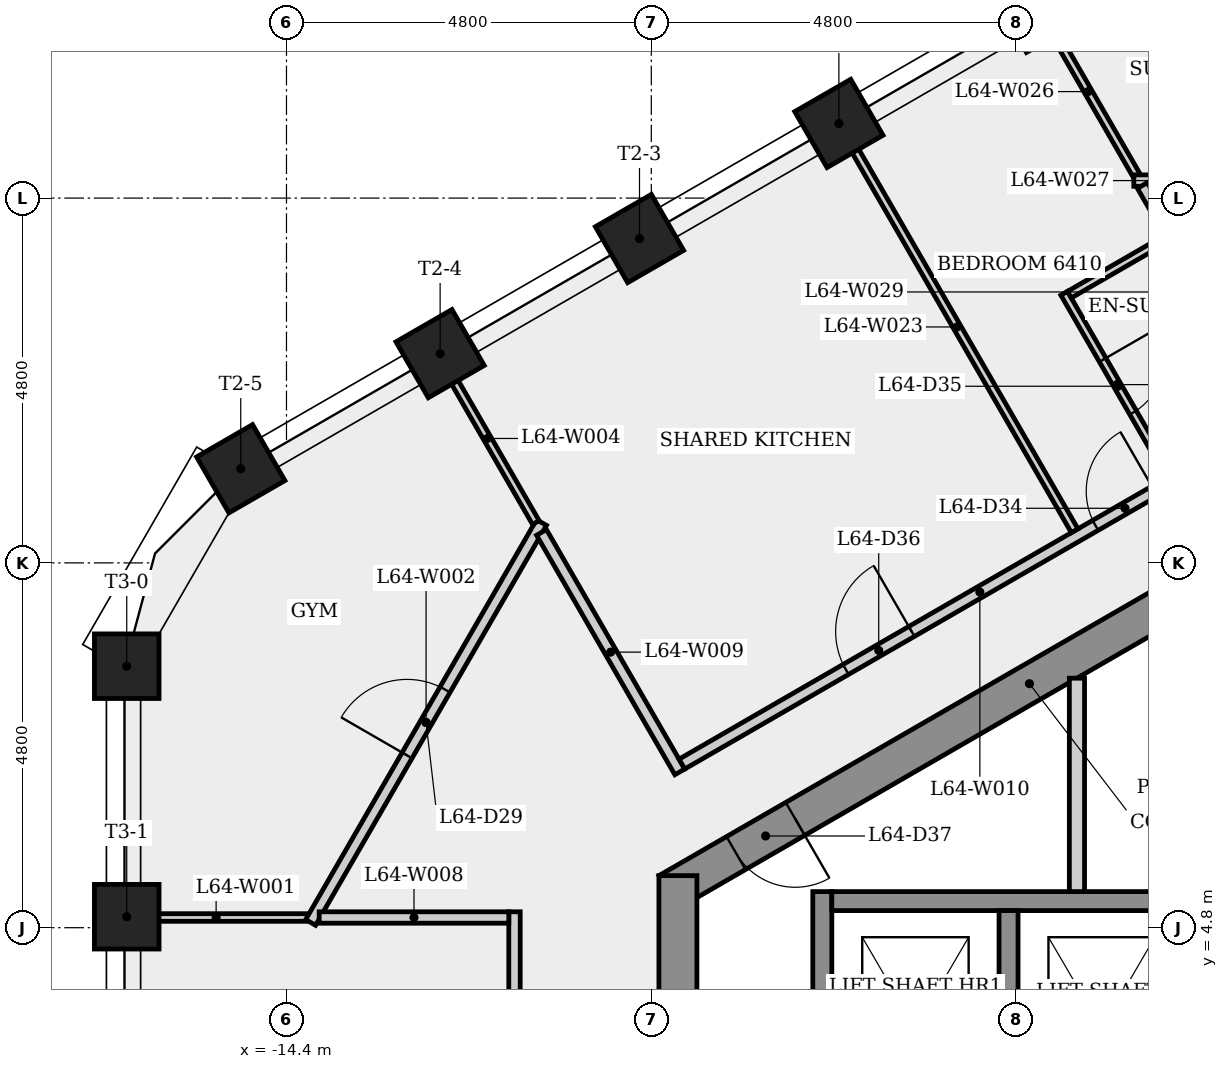
"""IFC4 building model, lengths in metres.
Left out: names, types, materials, properties, quantities, classifications, styles, units other than length and angle.
Written with IfcOpenShell. Run it as: python <this file> out.ifc"""

import sys

from ifc_helpers import new_model, si_unit, direction, frame, frame_2d, origin, origin_2d, place, context, subcontext, project, spatial, rectangle, extrude, element, fill, save


model = new_model("IFC4")
c1 = context("Model", 3, precision=1e-05, world=origin(), true_north=direction((0.0, 1.0)))
c2 = subcontext(c1, "Body", "Model", "MODEL_VIEW")
j1 = project(units=[si_unit("LENGTHUNIT", "METRE"), si_unit("PLANEANGLEUNIT", "RADIAN")], contexts=[c1])
p1 = place(None, origin())
s1 = spatial("IfcSite", under=j1, at=p1, CompositionType="ELEMENT")
p2 = place(p1, origin())
s2 = spatial("IfcBuilding", under=s1, at=p2, CompositionType="ELEMENT")
p3 = place(p2, frame((0.0, 0.0, 239.3)))
s3 = spatial("IfcBuildingStorey", under=s2, at=p3, CompositionType="ELEMENT", Elevation=239.3)
p4 = place(p3, frame((0.125, 10.753, 0.0), z_axis=(0.0, 0.0, 1.0), x_axis=(-0.866023993627, -0.500002442456, 0.0)))
e1 = element("IfcWall", 1, at=p4, inside=s3, PredefinedType="SHEAR", context=c2, shape_type="SweptSolid", body=[
    extrude(rectangle(XDim=10.97, YDim=0.5, at=frame_2d((5.485, 0.0))), origin(), (0.0, 0.0, 1.0), 3.4),
])
p5 = place(p4, frame((9.043, 0.0, 0.0)))
e2 = element("IfcOpeningElement", 2, at=p5, cuts=e1, PredefinedType="OPENING", context=c2, shape_type="SweptSolid", body=[
    extrude(rectangle(XDim=0.9, YDim=2.1, at=frame_2d((0.45, 1.05))), frame((0.0, 0.26, 0.0), z_axis=(0.0, -1.0, 0.0), x_axis=(1.0, 0.0, 0.0)), (0.0, 0.0, 1.0), 0.52),
])
p6 = place(p4, frame((2.38, 0.0, 0.0)))
e3 = element("IfcOpeningElement", 3, at=p6, cuts=e1, PredefinedType="OPENING", context=c2, shape_type="SweptSolid", body=[
    extrude(rectangle(XDim=0.9, YDim=2.1, at=frame_2d((0.45, 1.05))), frame((0.0, 0.26, 0.0), z_axis=(0.0, -1.0, 0.0), x_axis=(1.0, 0.0, 0.0)), (0.0, 0.0, 1.0), 0.52),
])
p7 = place(p3, frame((-9.25, 5.485, 0.0), z_axis=(0.0, 0.0, 1.0), x_axis=(0.0, -1.0, 0.0)))
e4 = element("IfcWall", 4, at=p7, inside=s3, PredefinedType="SHEAR", context=c2, shape_type="SweptSolid", body=[
    extrude(rectangle(XDim=10.97, YDim=0.5, at=frame_2d((5.485, 0.0))), origin(), (0.0, 0.0, 1.0), 3.4),
])
p8 = place(p7, frame((8.51, 0.0, 0.0)))
e5 = element("IfcOpeningElement", 5, at=p8, cuts=e4, PredefinedType="OPENING", context=c2, shape_type="SweptSolid", body=[
    extrude(rectangle(XDim=0.9, YDim=2.1, at=frame_2d((0.45, 1.05))), frame((0.0, 0.26, 0.0), z_axis=(0.0, -1.0, 0.0), x_axis=(1.0, 0.0, 0.0)), (0.0, 0.0, 1.0), 0.52),
])
p9 = place(p7, frame((4.685, 0.0, 0.0)))
e6 = element("IfcOpeningElement", 6, at=p9, cuts=e4, PredefinedType="OPENING", context=c2, shape_type="SweptSolid", body=[
    extrude(rectangle(XDim=1.6, YDim=2.1, at=frame_2d((0.8, 1.05))), frame((0.0, 0.26, 0.0), z_axis=(0.0, -1.0, 0.0), x_axis=(1.0, 0.0, 0.0)), (0.0, 0.0, 1.0), 0.52),
])
for number, where, z_axis, x_axis in (
    (7, (-4.509, 16.897, 0.0), (0.0, 0.0, 1.0), (-0.5, 0.866, 0.0)),
    (8, (-7.132, 15.382, 0.0), (0.0, 0.0, 1.0), (-0.5, 0.866, 0.0)),
    (9, (-9.755, 13.868, 0.0), (0.0, 0.0, 1.0), (-0.5, 0.866, 0.0)),
    (10, (-12.379, 12.353, 0.0), (0.0, 0.0, 1.0), (-0.5, 0.866, 0.0)),
    (11, (-15.002, 10.839, 0.0), (0.0, 0.0, 1.0), (-0.5, 0.866, 0.0)),
    (12, (-16.502, 8.241, 0.0), (0.0, 0.0, 1.0), (-1.0, 0.0, 0.0)),
    (13, (-16.502, 4.944, 0.0), (0.0, 0.0, 1.0), (-1.0, 0.0, 0.0)),
):
    element("IfcColumn", number, at=place(p3, frame(where, z_axis=z_axis, x_axis=x_axis)), inside=s3, PredefinedType="COLUMN", context=c2, shape_type="SweptSolid", body=[
        extrude(rectangle(XDim=0.85, YDim=0.85, at=origin_2d()), origin(), (0.0, 0.0, 1.0), 3.4),
    ])
p10 = place(p3, frame((-14.12, 4.934, 0.0), z_axis=(0.0, 0.0, 1.0), x_axis=(-1.0, 0.0, 0.0)))
e14 = element("IfcWall", 14, at=p10, inside=s3, PredefinedType="PARTITIONING", context=c2, shape_type="SweptSolid", body=[
    extrude(rectangle(XDim=2.412, YDim=0.1, at=frame_2d((1.206, 0.0))), origin(), (0.0, 0.0, 1.0), 3.05),
])
p11 = place(p3, frame((-14.083, 4.869, 0.0), z_axis=(0.0, 0.0, 1.0), x_axis=(0.500011139556, 0.866018972263, 0.0)))
e15 = element("IfcWall", 15, at=p11, inside=s3, PredefinedType="PARTITIONING", context=c2, shape_type="SweptSolid", body=[
    extrude(rectangle(XDim=6.076, YDim=0.15, at=frame_2d((3.038, 0.0))), origin(), (0.0, 0.0, 1.0), 3.05),
])
p12 = place(p11, frame((2.538, 0.0, 0.0)))
e16 = element("IfcOpeningElement", 16, at=p12, cuts=e15, PredefinedType="OPENING", context=c2, shape_type="SweptSolid", body=[
    extrude(rectangle(XDim=1.0, YDim=2.1, at=frame_2d((0.5, 1.05))), frame((0.0, 0.085, 0.0), z_axis=(0.0, -1.0, 0.0), x_axis=(1.0, 0.0, 0.0)), (0.0, 0.0, 1.0), 0.17),
])
p13 = place(p3, frame((-12.396, 12.343, 0.0), z_axis=(0.0, 0.0, 1.0), x_axis=(0.499943114462, -0.866058244174, 0.0)))
e17 = element("IfcWall", 17, at=p13, inside=s3, PredefinedType="PARTITIONING", context=c2, shape_type="SweptSolid", body=[
    extrude(rectangle(XDim=2.554, YDim=0.1, at=frame_2d((1.277, 0.0))), origin(), (0.0, 0.0, 1.0), 3.05),
])
p14 = place(p3, frame((-11.4, -4.934, 0.0), z_axis=(0.0, 0.0, 1.0), x_axis=(0.0, 1.0, 0.0)))
e18 = element("IfcWall", 18, at=p14, inside=s3, PredefinedType="PARTITIONING", context=c2, shape_type="SweptSolid", body=[
    extrude(rectangle(XDim=9.943, YDim=0.15, at=frame_2d((4.972, 0.0))), origin(), (0.0, 0.0, 1.0), 3.05),
])
p15 = place(p14, frame((6.079, 0.0, 0.0)))
e19 = element("IfcOpeningElement", 19, at=p15, cuts=e18, PredefinedType="OPENING", context=c2, shape_type="SweptSolid", body=[
    extrude(rectangle(XDim=1.0, YDim=2.1, at=frame_2d((0.5, 1.05))), frame((0.0, 0.085, 0.0), z_axis=(0.0, -1.0, 0.0), x_axis=(1.0, 0.0, 0.0)), (0.0, 0.0, 1.0), 0.17),
])
p16 = place(p14, frame((1.144, 0.0, 0.0)))
e20 = element("IfcOpeningElement", 20, at=p16, cuts=e18, PredefinedType="OPENING", context=c2, shape_type="SweptSolid", body=[
    extrude(rectangle(XDim=1.0, YDim=2.1, at=frame_2d((0.5, 1.05))), frame((0.0, 0.085, 0.0), z_axis=(0.0, -1.0, 0.0), x_axis=(1.0, 0.0, 0.0)), (0.0, 0.0, 1.0), 0.17),
])
p17 = place(p3, frame((-11.475, 4.934, 0.0), z_axis=(0.0, 0.0, 1.0), x_axis=(-1.0, 0.0, 0.0)))
e21 = element("IfcWall", 21, at=p17, inside=s3, PredefinedType="PARTITIONING", context=c2, shape_type="SweptSolid", body=[
    extrude(rectangle(XDim=2.495, YDim=0.15, at=frame_2d((1.248, 0.0))), origin(), (0.0, 0.0, 1.0), 3.05),
])
p18 = place(p3, frame((-11.044, 10.001, 0.0), z_axis=(0.0, 0.0, 1.0), x_axis=(0.500007048974, -0.866021334019, 0.0)))
e22 = element("IfcWall", 22, at=p18, inside=s3, PredefinedType="PARTITIONING", context=c2, shape_type="SweptSolid", body=[
    extrude(rectangle(XDim=3.639, YDim=0.15, at=frame_2d((1.819, 0.0))), origin(), (0.0, 0.0, 1.0), 3.05),
])
p19 = place(p3, frame((-9.198, 6.953, 0.0), z_axis=(0.0, 0.0, 1.0), x_axis=(0.866018971722, 0.500011140494, 0.0)))
e23 = element("IfcWall", 23, at=p19, inside=s3, PredefinedType="PARTITIONING", context=c2, shape_type="SweptSolid", body=[
    extrude(rectangle(XDim=9.053, YDim=0.15, at=frame_2d((4.526, 0.0))), origin(), (0.0, 0.0, 1.0), 3.05),
])
p20 = place(p19, frame((6.282, 0.0, 0.0)))
e24 = element("IfcOpeningElement", 24, at=p20, cuts=e23, PredefinedType="OPENING", context=c2, shape_type="SweptSolid", body=[
    extrude(rectangle(XDim=0.9, YDim=2.1, at=frame_2d((0.45, 1.05))), frame((0.0, 0.085, 0.0), z_axis=(0.0, -1.0, 0.0), x_axis=(1.0, 0.0, 0.0)), (0.0, 0.0, 1.0), 0.17),
])
p21 = place(p19, frame((2.49, 0.0, 0.0)))
e25 = element("IfcOpeningElement", 25, at=p21, cuts=e23, PredefinedType="OPENING", context=c2, shape_type="SweptSolid", body=[
    extrude(rectangle(XDim=1.0, YDim=2.1, at=frame_2d((0.5, 1.05))), frame((0.0, 0.085, 0.0), z_axis=(0.0, -1.0, 0.0), x_axis=(1.0, 0.0, 0.0)), (0.0, 0.0, 1.0), 0.17),
])
p22 = place(p3, frame((-7.35, 1.925, 0.0), z_axis=(0.0, 0.0, 1.0), x_axis=(0.0, 1.0, 0.0)))
e26 = element("IfcWall", 26, at=p22, inside=s3, PredefinedType="SHEAR", context=c2, shape_type="SweptSolid", body=[
    extrude(rectangle(XDim=3.35, YDim=0.25, at=frame_2d((1.675, 0.0))), origin(), (0.0, 0.0, 1.0), 3.05),
])
p23 = place(p3, frame((-7.225, 5.15, 0.0), z_axis=(0.0, 0.0, 1.0), x_axis=(1.0, 0.0, 0.0)))
e27 = element("IfcWall", 27, at=p23, inside=s3, PredefinedType="SHEAR", context=c2, shape_type="SweptSolid", body=[
    extrude(rectangle(XDim=14.7, YDim=0.25, at=frame_2d((7.35, 0.0))), origin(), (0.0, 0.0, 1.0), 3.05),
])
p24 = place(p3, frame((-4.9, 5.025, 0.0), z_axis=(0.0, 0.0, 1.0), x_axis=(0.0, -1.0, 0.0)))
e28 = element("IfcWall", 28, at=p24, inside=s3, PredefinedType="SHEAR", context=c2, shape_type="SweptSolid", body=[
    extrude(rectangle(XDim=3.1, YDim=0.25, at=frame_2d((1.55, 0.0))), origin(), (0.0, 0.0, 1.0), 3.4),
])
p25 = place(p3, frame((-4.168, 13.147, 0.0), z_axis=(0.0, 0.0, 1.0), x_axis=(0.499971228071, -0.866042014628, 0.0)))
e29 = element("IfcWall", 29, at=p25, inside=s3, PredefinedType="PARTITIONING", context=c2, shape_type="SweptSolid", body=[
    extrude(rectangle(XDim=2.775, YDim=0.1, at=frame_2d((1.388, 0.0))), origin(), (0.0, 0.0, 1.0), 3.05),
])
p26 = place(p25, frame((1.012, 0.0, 0.0)))
e30 = element("IfcOpeningElement", 30, at=p26, cuts=e29, PredefinedType="OPENING", context=c2, shape_type="SweptSolid", body=[
    extrude(rectangle(XDim=0.8, YDim=2.1, at=frame_2d((0.4, 1.05))), frame((0.0, 0.06, 0.0), z_axis=(0.0, -1.0, 0.0), x_axis=(1.0, 0.0, 0.0)), (0.0, 0.0, 1.0), 0.12),
])
p27 = place(p3, frame((-4.0, 8.083, 0.0), z_axis=(0.0, 0.0, 1.0), x_axis=(0.0, -1.0, 0.0)))
e31 = element("IfcWall", 31, at=p27, inside=s3, PredefinedType="PARTITIONING", context=c2, shape_type="SweptSolid", body=[
    extrude(rectangle(XDim=2.808, YDim=0.2, at=frame_2d((1.404, 0.0))), origin(), (0.0, 0.0, 1.0), 3.05),
])
p28 = place(p3, frame((-4.03, 10.023, 0.0), z_axis=(0.0, 0.0, 1.0), x_axis=(-0.499980681017, 0.866036557317, 0.0)))
e32 = element("IfcWall", 32, at=p28, inside=s3, PredefinedType="PARTITIONING", context=c2, shape_type="SweptSolid", body=[
    extrude(rectangle(XDim=6.193, YDim=0.1, at=frame_2d((3.096, 0.0))), origin(), (0.0, 0.0, 1.0), 3.05),
])
p29 = place(p3, frame((-3.214, 14.695, 0.0), z_axis=(0.0, 0.0, 1.0), x_axis=(-0.500056202316, 0.865992952931, 0.0)))
e33 = element("IfcWall", 33, at=p29, inside=s3, PredefinedType="PARTITIONING", context=c2, shape_type="SweptSolid", body=[
    extrude(rectangle(XDim=2.554, YDim=0.1, at=frame_2d((1.277, 0.0))), origin(), (0.0, 0.0, 1.0), 3.05),
])
p30 = place(p3, frame((-3.252, 14.63, 0.0), z_axis=(0.0, 0.0, 1.0), x_axis=(1.0, 0.0, 0.0)))
e34 = element("IfcWall", 34, at=p30, inside=s3, PredefinedType="PARTITIONING", context=c2, shape_type="SweptSolid", body=[
    extrude(rectangle(XDim=3.26, YDim=0.15, at=frame_2d((1.63, 0.0))), origin(), (0.0, 0.0, 1.0), 3.05),
])
p31 = place(p30, frame((1.185, 0.0, 0.0)))
e35 = element("IfcOpeningElement", 35, at=p31, cuts=e34, PredefinedType="OPENING", context=c2, shape_type="SweptSolid", body=[
    extrude(rectangle(XDim=1.0, YDim=2.1, at=frame_2d((0.5, 1.05))), frame((0.0, 0.085, 0.0), z_axis=(0.0, -1.0, 0.0), x_axis=(1.0, 0.0, 0.0)), (0.0, 0.0, 1.0), 0.17),
])
p32 = place(p3, frame((-2.823, 13.867, 0.0), z_axis=(0.0, 0.0, 1.0), x_axis=(-0.865962262849, -0.500109347365, 0.0)))
e36 = element("IfcWall", 36, at=p32, inside=s3, PredefinedType="PARTITIONING", context=c2, shape_type="SweptSolid", body=[
    extrude(rectangle(XDim=1.475, YDim=0.1, at=frame_2d((0.737, 0.0))), origin(), (0.0, 0.0, 1.0), 3.05),
])
p33 = place(p3, frame((-3.139, 14.565, 0.0), z_axis=(0.0, 0.0, 1.0), x_axis=(0.4999707335, -0.866042300147, 0.0)))
e37 = element("IfcWall", 37, at=p33, inside=s3, PredefinedType="PARTITIONING", context=c2, shape_type="SweptSolid", body=[
    extrude(rectangle(XDim=3.235, YDim=0.15, at=frame_2d((1.617, 0.0))), origin(), (0.0, 0.0, 1.0), 3.05),
])
p34 = place(p12, origin())
e38 = element("IfcDoor", 38, at=p34, inside=s3, OperationType="SINGLE_SWING_LEFT", PredefinedType="DOOR", context=c2, shape_type="SweptSolid", body=[
    extrude(rectangle(XDim=1.0, YDim=2.1, at=frame_2d((0.5, 1.05))), frame((0.0, 0.025, 0.0), z_axis=(0.0, -1.0, 0.0), x_axis=(1.0, 0.0, 0.0)), (0.0, 0.0, 1.0), 0.05),
])
fill(e16, e38)
p35 = place(p20, origin())
e39 = element("IfcDoor", 39, at=p35, inside=s3, OperationType="SINGLE_SWING_RIGHT", PredefinedType="DOOR", context=c2, shape_type="SweptSolid", body=[
    extrude(rectangle(XDim=0.9, YDim=2.1, at=frame_2d((0.45, 1.05))), frame((0.0, 0.025, 0.0), z_axis=(0.0, -1.0, 0.0), x_axis=(1.0, 0.0, 0.0)), (0.0, 0.0, 1.0), 0.05),
])
fill(e24, e39)
p36 = place(p26, origin())
e40 = element("IfcDoor", 40, at=p36, inside=s3, OperationType="SINGLE_SWING_LEFT", PredefinedType="DOOR", context=c2, shape_type="SweptSolid", body=[
    extrude(rectangle(XDim=0.8, YDim=2.1, at=frame_2d((0.4, 1.05))), frame((0.0, 0.025, 0.0), z_axis=(0.0, -1.0, 0.0), x_axis=(1.0, 0.0, 0.0)), (0.0, 0.0, 1.0), 0.05),
])
fill(e30, e40)
p37 = place(p21, origin())
e41 = element("IfcDoor", 41, at=p37, inside=s3, OperationType="SINGLE_SWING_RIGHT", PredefinedType="DOOR", context=c2, shape_type="SweptSolid", body=[
    extrude(rectangle(XDim=1.0, YDim=2.1, at=frame_2d((0.5, 1.05))), frame((0.0, 0.025, 0.0), z_axis=(0.0, -1.0, 0.0), x_axis=(1.0, 0.0, 0.0)), (0.0, 0.0, 1.0), 0.05),
])
fill(e25, e41)
p38 = place(p5, origin())
e42 = element("IfcDoor", 42, at=p38, inside=s3, OperationType="SINGLE_SWING_LEFT", PredefinedType="DOOR", context=c2, shape_type="SweptSolid", body=[
    extrude(rectangle(XDim=0.9, YDim=2.1, at=frame_2d((0.45, 1.05))), frame((0.0, 0.025, 0.0), z_axis=(0.0, -1.0, 0.0), x_axis=(1.0, 0.0, 0.0)), (0.0, 0.0, 1.0), 0.05),
])
fill(e2, e42)
save(model, sys.argv[1])
